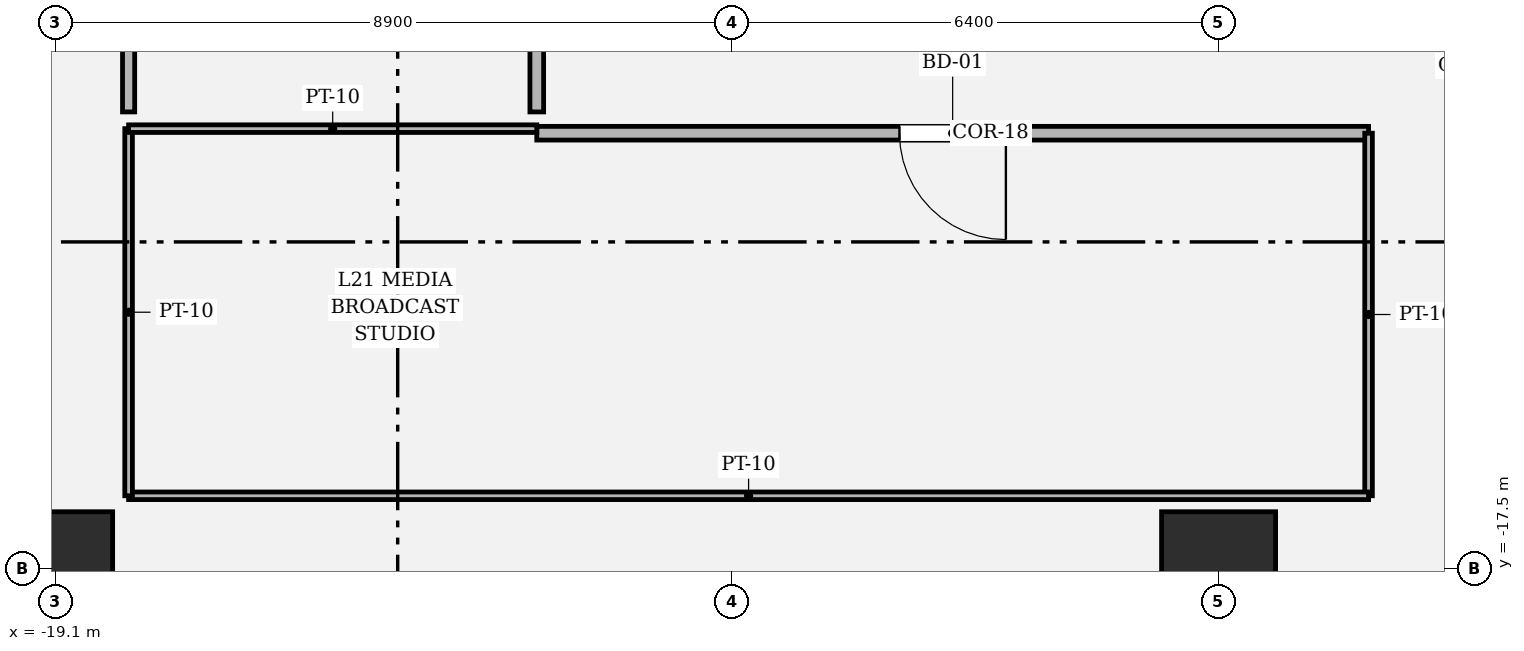
"""IFC4 building model, lengths in metres.
Left out: names, types, materials, properties, quantities, classifications, styles, units other than length and angle.
Written with IfcOpenShell. Run it as: python <this file> out.ifc"""

import sys

from ifc_helpers import new_model, si_unit, direction, frame, frame_2d, origin, origin_2d, place, context, subcontext, project, spatial, rectangle, hollow_rectangle, extrude, element, fill, save


model = new_model("IFC4")
c1 = context("Model", 3, precision=1e-05, world=origin(), true_north=direction((0.0, 1.0)))
c2 = subcontext(c1, "Body", "Model", "MODEL_VIEW")
j1 = project(units=[si_unit("LENGTHUNIT", "METRE"), si_unit("PLANEANGLEUNIT", "RADIAN")], contexts=[c1])
p1 = place(None, origin())
s1 = spatial("IfcSite", under=j1, at=p1, CompositionType="ELEMENT")
p2 = place(p1, origin())
s2 = spatial("IfcBuilding", under=s1, at=p2, CompositionType="ELEMENT")
p3 = place(p2, frame((0.0, 0.0, 93.0)))
s3 = spatial("IfcBuildingStorey", under=s2, at=p3, CompositionType="ELEMENT", Elevation=93.0)
for number, where, z_axis, x_axis in (
    (1, (-19.1, -17.5, 0.0), (0.0, 0.0, 1.0), (1.0, 0.0, 0.0)),
    (2, (-3.8, -17.5, 0.0), (0.0, 0.0, 1.0), (1.0, 0.0, 0.0)),
):
    element("IfcColumn", number, at=place(p3, frame(where, z_axis=z_axis, x_axis=x_axis)), inside=s3, PredefinedType="COLUMN", context=c2, shape_type="SweptSolid", body=[
        extrude(hollow_rectangle(XDim=1.5, YDim=1.5, WallThickness=0.045, at=origin_2d()), origin(), (0.0, 0.0, 1.0), 4.05),
    ])
p4 = place(p3, frame((-19.646, -16.949, 0.0), z_axis=(0.0, 0.0, 1.0), x_axis=(0.707106781187, -0.707106781187, 0.0)))
e3 = element("IfcWall", 3, at=p4, inside=s3, PredefinedType="SOLIDWALL", context=c2, shape_type="SweptSolid", body=[
    extrude(rectangle(XDim=1.552, YDim=0.32, at=frame_2d((0.776, 0.0))), origin(), (0.0, 0.0, 1.0), 3.104),
])
p5 = place(p3, frame((-12.77, -11.77, 0.0), z_axis=(0.0, 0.0, 1.0), x_axis=(1.0, 0.0, 0.0)))
e4 = element("IfcWall", 4, at=p5, inside=s3, PredefinedType="PARTITIONING", context=c2, shape_type="SweptSolid", body=[
    extrude(rectangle(XDim=10.943, YDim=0.18, at=frame_2d((5.472, 0.0))), origin(), (0.0, 0.0, 1.0), 3.104),
])
p6 = place(p5, frame((4.771, 0.0, 0.0)))
e5 = element("IfcOpeningElement", 5, at=p6, cuts=e4, PredefinedType="OPENING", context=c2, shape_type="SweptSolid", body=[
    extrude(rectangle(XDim=1.4, YDim=2.25, at=frame_2d((0.7, 1.125))), frame((0.0, 0.1, 0.0), z_axis=(0.0, -1.0, 0.0), x_axis=(1.0, 0.0, 0.0)), (0.0, 0.0, 1.0), 0.2),
])
p7 = place(p3, frame((-1.827, -11.77, 0.0), z_axis=(0.0, 0.0, 1.0), x_axis=(0.0, -1.0, 0.0)))
e6 = element("IfcWall", 6, at=p7, inside=s3, PredefinedType="PARTITIONING", context=c2, shape_type="SweptSolid", body=[
    extrude(rectangle(XDim=4.77, YDim=0.1, at=frame_2d((2.385, 0.0))), origin(), (0.0, 0.0, 1.0), 3.81),
])
p8 = place(p3, frame((-1.827, -16.54, 0.0), z_axis=(0.0, 0.0, 1.0), x_axis=(-1.0, 0.0, 0.0)))
e7 = element("IfcWall", 7, at=p8, inside=s3, PredefinedType="PARTITIONING", context=c2, shape_type="SweptSolid", body=[
    extrude(rectangle(XDim=16.313, YDim=0.1, at=frame_2d((8.156, 0.0))), origin(), (0.0, 0.0, 1.0), 3.104),
])
p9 = place(p3, frame((-18.14, -16.54, 0.0), z_axis=(0.0, 0.0, 1.0), x_axis=(0.0, 1.0, 0.0)))
e8 = element("IfcWall", 8, at=p9, inside=s3, PredefinedType="PARTITIONING", context=c2, shape_type="SweptSolid", body=[
    extrude(rectangle(XDim=4.83, YDim=0.1, at=frame_2d((2.415, 0.0))), origin(), (0.0, 0.0, 1.0), 3.354),
])
p10 = place(p3, frame((-18.14, -11.71, 0.0), z_axis=(0.0, 0.0, 1.0), x_axis=(1.0, 0.0, 0.0)))
e9 = element("IfcWall", 9, at=p10, inside=s3, PredefinedType="PARTITIONING", context=c2, shape_type="SweptSolid", body=[
    extrude(rectangle(XDim=5.37, YDim=0.1, at=frame_2d((2.685, 0.0))), origin(), (0.0, 0.0, 1.0), 3.354),
])
p11 = place(p3, frame((-18.14, -11.49, 0.0), z_axis=(0.0, 0.0, 1.0), x_axis=(0.0, 1.0, 0.0)))
e10 = element("IfcWall", 10, at=p11, inside=s3, PredefinedType="PARTITIONING", context=c2, shape_type="SweptSolid", body=[
    extrude(rectangle(XDim=22.98, YDim=0.16, at=frame_2d((11.49, 0.0))), origin(), (0.0, 0.0, 1.0), 3.104),
])
p12 = place(p3, frame((-12.77, 11.49, 0.0), z_axis=(0.0, 0.0, 1.0), x_axis=(0.0, -1.0, 0.0)))
e11 = element("IfcWall", 11, at=p12, inside=s3, PredefinedType="PARTITIONING", context=c2, shape_type="SweptSolid", body=[
    extrude(rectangle(XDim=22.98, YDim=0.18, at=frame_2d((11.49, 0.0))), origin(), (0.0, 0.0, 1.0), 3.104),
])
p13 = place(p12, frame((10.965, 0.0, 0.0)))
e12 = element("IfcOpeningElement", 12, at=p13, cuts=e11, PredefinedType="OPENING", context=c2, shape_type="SweptSolid", body=[
    extrude(rectangle(XDim=1.05, YDim=2.2, at=frame_2d((0.525, 1.1))), frame((0.0, 0.1, 0.0), z_axis=(0.0, -1.0, 0.0), x_axis=(1.0, 0.0, 0.0)), (0.0, 0.0, 1.0), 0.2),
])
p14 = place(p6, origin())
e13 = element("IfcDoor", 13, at=p14, inside=s3, OperationType="SINGLE_SWING_RIGHT", PredefinedType="DOOR", context=c2, shape_type="SweptSolid", body=[
    extrude(rectangle(XDim=1.4, YDim=2.25, at=frame_2d((0.7, 1.125))), frame((0.0, 0.025, 0.0), z_axis=(0.0, -1.0, 0.0), x_axis=(1.0, 0.0, 0.0)), (0.0, 0.0, 1.0), 0.05),
])
fill(e5, e13)
save(model, sys.argv[1])
